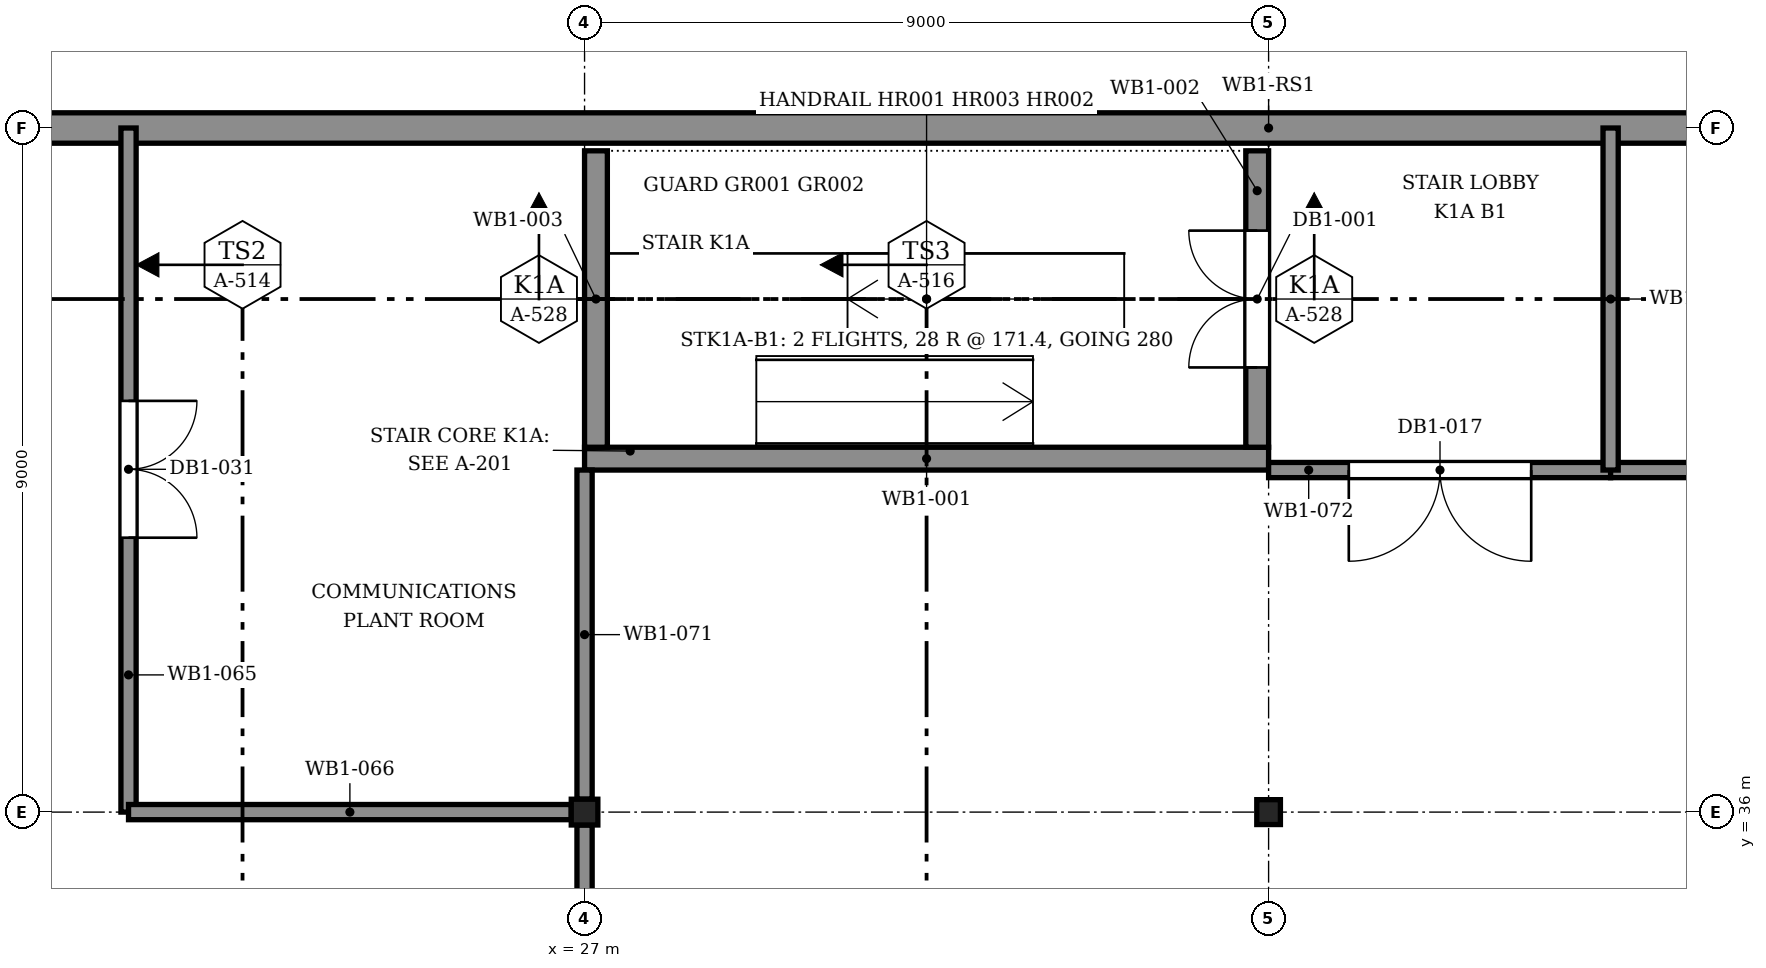
"""IFC4 building model, lengths in metres.
Left out: names, types, materials, properties, quantities, classifications, styles, units other than length and angle.
Written with IfcOpenShell. Run it as: python <this file> out.ifc"""

import sys

from ifc_helpers import new_model, si_unit, direction, frame, frame_2d, origin, origin_2d, place, context, subcontext, project, spatial, rectangle, i_section, extrude, element, fill, save


model = new_model("IFC4")
c1 = context("Model", 3, precision=1e-05, world=origin(), true_north=direction((0.0, 1.0)))
c2 = subcontext(c1, "Body", "Model", "MODEL_VIEW")
j1 = project(units=[si_unit("LENGTHUNIT", "METRE"), si_unit("PLANEANGLEUNIT", "RADIAN")], contexts=[c1])
p1 = place(None, origin())
s1 = spatial("IfcSite", under=j1, at=p1, CompositionType="ELEMENT")
p2 = place(p1, origin())
s2 = spatial("IfcBuilding", under=s1, at=p2, CompositionType="ELEMENT")
p3 = place(p2, frame((0.0, 0.0, -4.8)))
s3 = spatial("IfcBuildingStorey", under=s2, at=p3, CompositionType="ELEMENT", Elevation=-4.8)
p4 = place(p3, frame((0.0, 45.0, 0.0), z_axis=(0.0, 0.0, 1.0), x_axis=(1.0, 0.0, 0.0)))
e1 = element("IfcWall", 1, at=p4, inside=s3, PredefinedType="SOLIDWALL", context=c2, shape_type="SweptSolid", body=[
    extrude(rectangle(XDim=72.0, YDim=0.4, at=frame_2d((36.0, 0.0))), origin(), (0.0, 0.0, 1.0), 4.8),
])
p5 = place(p3, frame((27.0, 36.0, 0.0), z_axis=(0.0, 0.0, 1.0), x_axis=(1.0, 0.0, 0.0)))
e2 = element("IfcColumn", 2, at=p5, inside=s3, PredefinedType="COLUMN", context=c2, shape_type="SweptSolid", body=[
    extrude(i_section(OverallWidth=0.35, OverallDepth=0.339, WebThickness=0.025, FlangeThickness=0.032, at=origin_2d()), origin(), (0.0, 0.0, 1.0), 4.8),
])
p6 = place(p3, frame((36.0, 36.0, 0.0), z_axis=(0.0, 0.0, 1.0), x_axis=(1.0, 0.0, 0.0)))
e3 = element("IfcColumn", 3, at=p6, inside=s3, PredefinedType="COLUMN", context=c2, shape_type="SweptSolid", body=[
    extrude(i_section(OverallWidth=0.311, OverallDepth=0.327, WebThickness=0.016, FlangeThickness=0.025, FilletRadius=0.017, at=origin_2d()), origin(), (0.0, 0.0, 1.0), 4.8),
])
p7 = place(p3, frame((27.0, 40.65, 0.0), z_axis=(0.0, 0.0, 1.0), x_axis=(1.0, 0.0, 0.0)))
e4 = element("IfcWall", 4, at=p7, inside=s3, PredefinedType="SOLIDWALL", context=c2, shape_type="SweptSolid", body=[
    extrude(rectangle(XDim=9.0, YDim=0.3, at=frame_2d((4.5, 0.0))), origin(), (0.0, 0.0, 1.0), 4.8),
])
p8 = place(p3, frame((35.85, 40.8, 0.0), z_axis=(0.0, 0.0, 1.0), x_axis=(0.0, 1.0, 0.0)))
e5 = element("IfcWall", 5, at=p8, inside=s3, PredefinedType="SOLIDWALL", context=c2, shape_type="SweptSolid", body=[
    extrude(rectangle(XDim=3.9, YDim=0.3, at=frame_2d((1.95, 0.0))), origin(), (0.0, 0.0, 1.0), 4.8),
])
p9 = place(p8, frame((1.05, 0.0, 0.0)))
e6 = element("IfcOpeningElement", 6, at=p9, cuts=e5, PredefinedType="OPENING", context=c2, shape_type="SweptSolid", body=[
    extrude(rectangle(XDim=1.8, YDim=2.1, at=frame_2d((0.9, 1.05))), frame((0.0, 0.16, 0.0), z_axis=(0.0, -1.0, 0.0), x_axis=(1.0, 0.0, 0.0)), (0.0, 0.0, 1.0), 0.32),
])
p10 = place(p3, frame((27.15, 40.8, 0.0), z_axis=(0.0, 0.0, 1.0), x_axis=(0.0, 1.0, 0.0)))
e7 = element("IfcWall", 7, at=p10, inside=s3, PredefinedType="SOLIDWALL", context=c2, shape_type="SweptSolid", body=[
    extrude(rectangle(XDim=3.9, YDim=0.3, at=frame_2d((1.95, 0.0))), origin(), (0.0, 0.0, 1.0), 4.8),
])
p11 = place(p3, frame((21.0, 36.0, 0.0), z_axis=(0.0, 0.0, 1.0), x_axis=(0.0, 1.0, 0.0)))
e8 = element("IfcWall", 8, at=p11, inside=s3, PredefinedType="PARTITIONING", context=c2, shape_type="SweptSolid", body=[
    extrude(rectangle(XDim=9.0, YDim=0.2, at=frame_2d((4.5, 0.0))), origin(), (0.0, 0.0, 1.0), 4.023),
])
p12 = place(p11, frame((3.61, 0.0, 0.0)))
e9 = element("IfcOpeningElement", 9, at=p12, cuts=e8, PredefinedType="OPENING", context=c2, shape_type="SweptSolid", body=[
    extrude(rectangle(XDim=1.8, YDim=2.1, at=frame_2d((0.9, 1.05))), frame((0.0, 0.11, 0.0), z_axis=(0.0, -1.0, 0.0), x_axis=(1.0, 0.0, 0.0)), (0.0, 0.0, 1.0), 0.22),
])
p13 = place(p3, frame((21.0, 36.0, 0.0), z_axis=(0.0, 0.0, 1.0), x_axis=(1.0, 0.0, 0.0)))
e10 = element("IfcWall", 10, at=p13, inside=s3, PredefinedType="PARTITIONING", context=c2, shape_type="SweptSolid", body=[
    extrude(rectangle(XDim=5.825, YDim=0.2, at=frame_2d((2.913, 0.0))), origin(), (0.0, 0.0, 1.0), 4.023),
])
p14 = place(p3, frame((27.0, 31.5, 0.0), z_axis=(0.0, 0.0, 1.0), x_axis=(0.0, 1.0, 0.0)))
e11 = element("IfcWall", 11, at=p14, inside=s3, PredefinedType="PARTITIONING", context=c2, shape_type="SweptSolid", body=[
    extrude(rectangle(XDim=4.331, YDim=0.2, at=frame_2d((2.165, 0.0))), origin(), (0.0, 0.0, 1.0), 4.023),
])
p15 = place(p14, frame((1.01, 0.0, 0.0)))
e12 = element("IfcOpeningElement", 12, at=p15, cuts=e11, PredefinedType="OPENING", context=c2, shape_type="SweptSolid", body=[
    extrude(rectangle(XDim=2.4, YDim=2.4, at=frame_2d((1.2, 1.2))), frame((0.0, 0.11, 0.0), z_axis=(0.0, -1.0, 0.0), x_axis=(1.0, 0.0, 0.0)), (0.0, 0.0, 1.0), 0.22),
])
p16 = place(p3, frame((27.0, 36.169, 0.0), z_axis=(0.0, 0.0, 1.0), x_axis=(0.0, 1.0, 0.0)))
e13 = element("IfcWall", 13, at=p16, inside=s3, PredefinedType="PARTITIONING", context=c2, shape_type="SweptSolid", body=[
    extrude(rectangle(XDim=4.331, YDim=0.2, at=frame_2d((2.165, 0.0))), origin(), (0.0, 0.0, 1.0), 4.023),
])
p17 = place(p3, frame((36.0, 40.5, 0.0), z_axis=(0.0, 0.0, 1.0), x_axis=(1.0, 0.0, 0.0)))
e14 = element("IfcWall", 14, at=p17, inside=s3, PredefinedType="PARTITIONING", context=c2, shape_type="SweptSolid", body=[
    extrude(rectangle(XDim=4.5, YDim=0.2, at=frame_2d((2.25, 0.0))), origin(), (0.0, 0.0, 1.0), 4.023),
])
p18 = place(p17, frame((1.055, 0.0, 0.0)))
e15 = element("IfcOpeningElement", 15, at=p18, cuts=e14, PredefinedType="OPENING", context=c2, shape_type="SweptSolid", body=[
    extrude(rectangle(XDim=2.4, YDim=2.4, at=frame_2d((1.2, 1.2))), frame((0.0, 0.11, 0.0), z_axis=(0.0, -1.0, 0.0), x_axis=(1.0, 0.0, 0.0)), (0.0, 0.0, 1.0), 0.22),
])
p19 = place(p3, frame((40.5, 40.5, 0.0), z_axis=(0.0, 0.0, 1.0), x_axis=(1.0, 0.0, 0.0)))
e16 = element("IfcWall", 16, at=p19, inside=s3, PredefinedType="PARTITIONING", context=c2, shape_type="SweptSolid", body=[
    extrude(rectangle(XDim=18.0, YDim=0.2, at=frame_2d((9.0, 0.0))), origin(), (0.0, 0.0, 1.0), 4.023),
])
p20 = place(p19, frame((8.11, 0.0, 0.0)))
e17 = element("IfcOpeningElement", 17, at=p20, cuts=e16, PredefinedType="OPENING", context=c2, shape_type="SweptSolid", body=[
    extrude(rectangle(XDim=1.8, YDim=2.1, at=frame_2d((0.9, 1.05))), frame((0.0, 0.11, 0.0), z_axis=(0.0, -1.0, 0.0), x_axis=(1.0, 0.0, 0.0)), (0.0, 0.0, 1.0), 0.22),
])
p21 = place(p3, frame((40.5, 40.5, 0.0), z_axis=(0.0, 0.0, 1.0), x_axis=(0.0, 1.0, 0.0)))
e18 = element("IfcWall", 18, at=p21, inside=s3, PredefinedType="PARTITIONING", context=c2, shape_type="SweptSolid", body=[
    extrude(rectangle(XDim=4.5, YDim=0.2, at=frame_2d((2.25, 0.0))), origin(), (0.0, 0.0, 1.0), 4.635),
])
p22 = place(p9, origin())
e19 = element("IfcDoor", 19, at=p22, inside=s3, OperationType="DOUBLE_DOOR_SINGLE_SWING", PredefinedType="DOOR", context=c2, shape_type="SweptSolid", body=[
    extrude(rectangle(XDim=1.8, YDim=2.1, at=frame_2d((0.9, 1.05))), frame((0.0, 0.025, 0.0), z_axis=(0.0, -1.0, 0.0), x_axis=(1.0, 0.0, 0.0)), (0.0, 0.0, 1.0), 0.05),
])
fill(e6, e19)
p23 = place(p18, frame((2.4, 0.0, 0.0), z_axis=(0.0, 0.0, 1.0), x_axis=(-1.0, 0.0, 0.0)))
e20 = element("IfcDoor", 20, at=p23, inside=s3, OperationType="DOUBLE_DOOR_SINGLE_SWING", PredefinedType="DOOR", context=c2, shape_type="SweptSolid", body=[
    extrude(rectangle(XDim=2.4, YDim=2.4, at=frame_2d((1.2, 1.2))), frame((0.0, 0.025, 0.0), z_axis=(0.0, -1.0, 0.0), x_axis=(1.0, 0.0, 0.0)), (0.0, 0.0, 1.0), 0.05),
])
fill(e15, e20)
p24 = place(p12, frame((1.8, 0.0, 0.0), z_axis=(0.0, 0.0, 1.0), x_axis=(-1.0, 0.0, 0.0)))
e21 = element("IfcDoor", 21, at=p24, inside=s3, OperationType="DOUBLE_DOOR_SINGLE_SWING", PredefinedType="DOOR", context=c2, shape_type="SweptSolid", body=[
    extrude(rectangle(XDim=1.8, YDim=2.1, at=frame_2d((0.9, 1.05))), frame((0.0, 0.025, 0.0), z_axis=(0.0, -1.0, 0.0), x_axis=(1.0, 0.0, 0.0)), (0.0, 0.0, 1.0), 0.05),
])
fill(e9, e21)
save(model, sys.argv[1])
